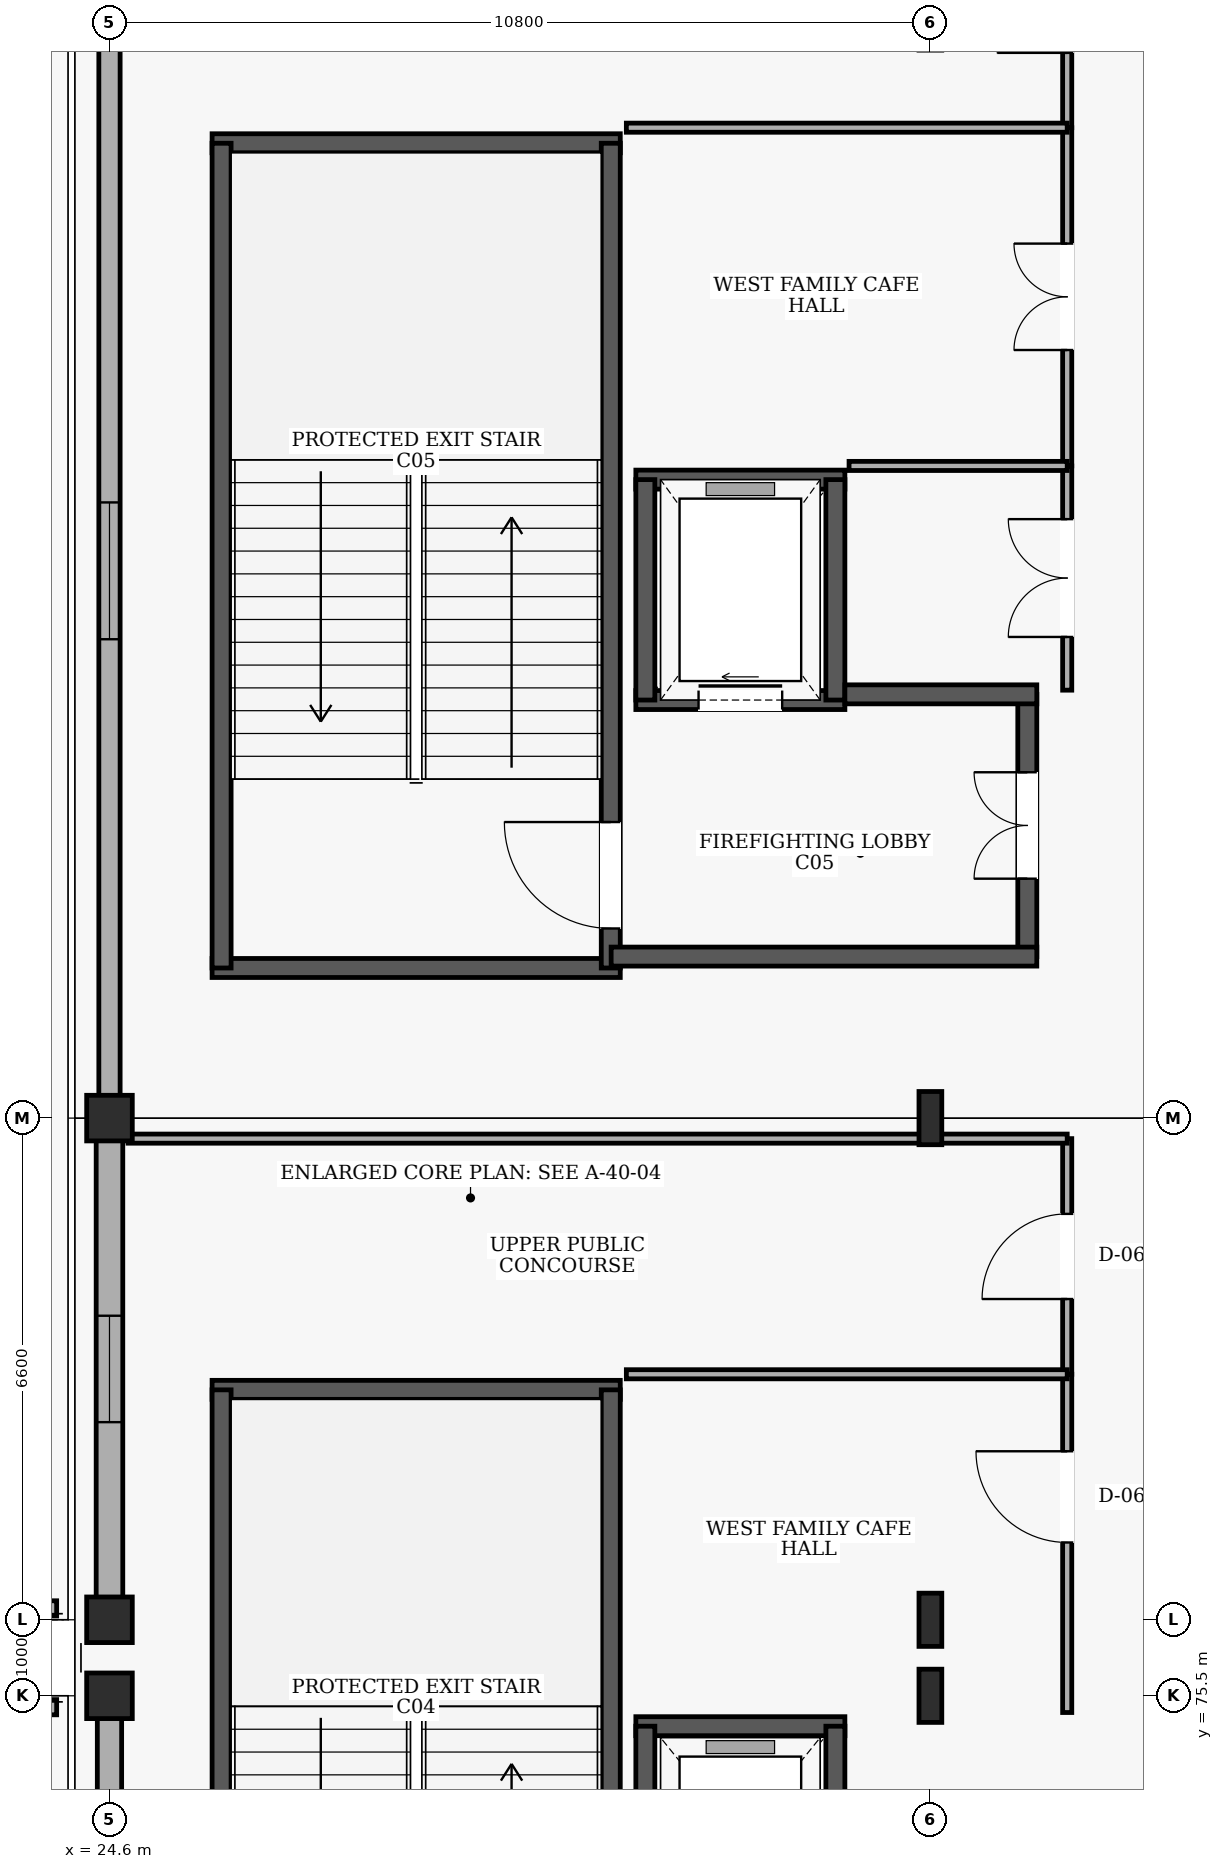
"""IFC4 building model, lengths in metres.
Left out: names, types, materials, properties, quantities, classifications, styles, units other than length and angle.
Written with IfcOpenShell. Run it as: python <this file> out.ifc"""

import sys

from ifc_helpers import new_model, si_unit, direction, frame, frame_2d, origin, origin_2d, place, context, subcontext, project, spatial, rectangle, i_section, extrude, element, fill, save


model = new_model("IFC4")
c1 = context("Model", 3, precision=1e-05, world=origin(), true_north=direction((0.0, 1.0)))
c2 = subcontext(c1, "Body", "Model", "MODEL_VIEW")
j1 = project(units=[si_unit("LENGTHUNIT", "METRE"), si_unit("PLANEANGLEUNIT", "RADIAN")], contexts=[c1])
p1 = place(None, origin())
s1 = spatial("IfcSite", under=j1, at=p1, CompositionType="ELEMENT")
p2 = place(p1, origin())
s2 = spatial("IfcBuilding", under=s1, at=p2, CompositionType="ELEMENT")
p3 = place(p2, frame((0.0, 0.0, 15.0)))
s3 = spatial("IfcBuildingStorey", under=s2, at=p3, CompositionType="ELEMENT", Elevation=15.0)
for number, where, z_axis, x_axis in (
    (1, (24.6, 75.5, 0.0), (0.0, 0.0, 1.0), (1.0, 0.0, 0.0)),
    (2, (24.6, 76.5, 0.0), (0.0, 0.0, 1.0), (1.0, 0.0, 0.0)),
    (3, (24.6, 83.1, 0.0), (0.0, 0.0, 1.0), (1.0, 0.0, 0.0)),
):
    element("IfcColumn", number, at=place(p3, frame(where, z_axis=z_axis, x_axis=x_axis)), inside=s3, PredefinedType="COLUMN", context=c2, shape_type="SweptSolid", body=[
        extrude(rectangle(XDim=0.6, YDim=0.6, at=origin_2d()), origin(), (0.0, 0.0, 1.0), 4.8),
    ])
for number, where, z_axis, x_axis in (
    (4, (35.4, 75.5, 0.0), (0.0, 0.0, 1.0), (1.0, 0.0, 0.0)),
    (5, (35.4, 76.5, 0.0), (0.0, 0.0, 1.0), (1.0, 0.0, 0.0)),
    (6, (35.4, 83.1, 0.0), (0.0, 0.0, 1.0), (1.0, 0.0, 0.0)),
):
    element("IfcColumn", number, at=place(p3, frame(where, z_axis=z_axis, x_axis=x_axis)), inside=s3, PredefinedType="COLUMN", context=c2, shape_type="SweptSolid", body=[
        extrude(i_section(OverallWidth=0.3, OverallDepth=0.7, WebThickness=0.017, FlangeThickness=0.032, at=origin_2d()), origin(), (0.0, 0.0, 1.0), 4.8),
    ])
p4 = place(p3, frame((24.6, 68.995, 0.0), z_axis=(0.0, 0.0, 1.0), x_axis=(0.0, 1.0, 0.0)))
e7 = element("IfcWall", 7, at=p4, inside=s3, PredefinedType="SOLIDWALL", context=c2, shape_type="SweptSolid", body=[
    extrude(rectangle(XDim=6.21, YDim=0.32, at=frame_2d((3.105, 0.0))), origin(), (0.0, 0.0, 1.0), 3.88),
])
p5 = place(p4, frame((1.755, 0.0, 0.9)))
e8 = element("IfcOpeningElement", 8, at=p5, cuts=e7, PredefinedType="OPENING", context=c2, shape_type="SweptSolid", body=[
    extrude(rectangle(XDim=2.7, YDim=1.8, at=frame_2d((1.35, 0.9))), frame((0.0, 0.17, 0.0), z_axis=(0.0, -1.0, 0.0), x_axis=(1.0, 0.0, 0.0)), (0.0, 0.0, 1.0), 0.34),
])
p6 = place(p3, frame((24.6, 76.795, 0.0), z_axis=(0.0, 0.0, 1.0), x_axis=(0.0, 1.0, 0.0)))
e9 = element("IfcWall", 9, at=p6, inside=s3, PredefinedType="SOLIDWALL", context=c2, shape_type="SweptSolid", body=[
    extrude(rectangle(XDim=6.01, YDim=0.35, at=frame_2d((3.005, 0.0))), origin(), (0.0, 0.0, 1.0), 3.98),
])
p7 = place(p6, frame((2.305, 0.0, 0.9)))
e10 = element("IfcOpeningElement", 10, at=p7, cuts=e9, PredefinedType="OPENING", context=c2, shape_type="SweptSolid", body=[
    extrude(rectangle(XDim=1.4, YDim=2.1, at=frame_2d((0.7, 1.05))), frame((0.0, 0.185, 0.0), z_axis=(0.0, -1.0, 0.0), x_axis=(1.0, 0.0, 0.0)), (0.0, 0.0, 1.0), 0.37),
])
p8 = place(p3, frame((24.6, 83.395, 0.0), z_axis=(0.0, 0.0, 1.0), x_axis=(0.0, 1.0, 0.0)))
e11 = element("IfcWall", 11, at=p8, inside=s3, PredefinedType="SOLIDWALL", context=c2, shape_type="SweptSolid", body=[
    extrude(rectangle(XDim=13.81, YDim=0.28, at=frame_2d((6.905, 0.0))), origin(), (0.0, 0.0, 1.0), 3.58),
])
p9 = place(p8, frame((6.005, 0.0, 0.9)))
e12 = element("IfcOpeningElement", 12, at=p9, cuts=e11, PredefinedType="OPENING", context=c2, shape_type="SweptSolid", body=[
    extrude(rectangle(XDim=1.8, YDim=2.1, at=frame_2d((0.9, 1.05))), frame((0.0, 0.15, 0.0), z_axis=(0.0, -1.0, 0.0), x_axis=(1.0, 0.0, 0.0)), (0.0, 0.0, 1.0), 0.3),
])
for number, where, z_axis, x_axis in (
    (13, (14.028, 76.65, 0.0), (0.0, 0.0, 1.0), (1.0, 0.0, 0.0)),
    (14, (23.905, 75.35, 0.0), (0.0, 0.0, 1.0), (-1.0, 0.0, 0.0)),
):
    element("IfcWall", number, at=place(p3, frame(where, z_axis=z_axis, x_axis=x_axis)), inside=s3, PredefinedType="PARAPET", context=c2, shape_type="SweptSolid", body=[
        extrude(rectangle(XDim=9.877, YDim=0.2, at=frame_2d((4.939, 0.0))), origin(), (0.0, 0.0, 1.0), 1.15),
    ])
p10 = place(p3, frame((31.32, 79.525, 0.0), z_axis=(0.0, 0.0, 1.0), x_axis=(-1.0, 0.0, 0.0)))
e15 = element("IfcWall", 15, at=p10, inside=s3, PredefinedType="SHEAR", context=c2, shape_type="SweptSolid", body=[
    extrude(rectangle(XDim=5.37, YDim=0.25, at=frame_2d((2.685, 0.0))), origin(), (0.0, 0.0, 1.0), 4.5),
])
p11 = place(p3, frame((26.075, 68.675, 0.0), z_axis=(0.0, 0.0, 1.0), x_axis=(0.0, 1.0, 0.0)))
e16 = element("IfcWall", 16, at=p11, inside=s3, PredefinedType="SHEAR", context=c2, shape_type="SweptSolid", body=[
    extrude(rectangle(XDim=10.85, YDim=0.25, at=frame_2d((5.425, 0.0))), origin(), (0.0, 0.0, 1.0), 4.5),
])
p12 = place(p3, frame((31.195, 68.675, 0.0), z_axis=(0.0, 0.0, 1.0), x_axis=(0.0, 1.0, 0.0)))
e17 = element("IfcWall", 17, at=p12, inside=s3, PredefinedType="SHEAR", context=c2, shape_type="SweptSolid", body=[
    extrude(rectangle(XDim=10.85, YDim=0.25, at=frame_2d((5.425, 0.0))), origin(), (0.0, 0.0, 1.0), 4.5),
])
p13 = place(p12, frame((0.52, 0.0, 0.0)))
e18 = element("IfcOpeningElement", 18, at=p13, cuts=e17, PredefinedType="OPENING", context=c2, shape_type="SweptSolid", body=[
    extrude(rectangle(XDim=1.4, YDim=2.15, at=frame_2d((0.7, 1.075))), frame((0.0, 0.135, 0.0), z_axis=(0.0, -1.0, 0.0), x_axis=(1.0, 0.0, 0.0)), (0.0, 0.0, 1.0), 0.27),
])
for number, where, z_axis, x_axis in (
    (19, (25.95, 85.075, 0.0), (0.0, 0.0, 1.0), (1.0, 0.0, 0.0)),
    (20, (31.32, 95.925, 0.0), (0.0, 0.0, 1.0), (-1.0, 0.0, 0.0)),
):
    element("IfcWall", number, at=place(p3, frame(where, z_axis=z_axis, x_axis=x_axis)), inside=s3, PredefinedType="SHEAR", context=c2, shape_type="SweptSolid", body=[
        extrude(rectangle(XDim=5.37, YDim=0.25, at=frame_2d((2.685, 0.0))), origin(), (0.0, 0.0, 1.0), 4.5),
    ])
p14 = place(p3, frame((26.075, 85.075, 0.0), z_axis=(0.0, 0.0, 1.0), x_axis=(0.0, 1.0, 0.0)))
e21 = element("IfcWall", 21, at=p14, inside=s3, PredefinedType="SHEAR", context=c2, shape_type="SweptSolid", body=[
    extrude(rectangle(XDim=10.85, YDim=0.25, at=frame_2d((5.425, 0.0))), origin(), (0.0, 0.0, 1.0), 4.5),
])
p15 = place(p3, frame((31.195, 85.075, 0.0), z_axis=(0.0, 0.0, 1.0), x_axis=(0.0, 1.0, 0.0)))
e22 = element("IfcWall", 22, at=p15, inside=s3, PredefinedType="SHEAR", context=c2, shape_type="SweptSolid", body=[
    extrude(rectangle(XDim=10.85, YDim=0.25, at=frame_2d((5.425, 0.0))), origin(), (0.0, 0.0, 1.0), 4.5),
])
p16 = place(p15, frame((0.52, 0.0, 0.0)))
e23 = element("IfcOpeningElement", 23, at=p16, cuts=e22, PredefinedType="OPENING", context=c2, shape_type="SweptSolid", body=[
    extrude(rectangle(XDim=1.4, YDim=2.15, at=frame_2d((0.7, 1.075))), frame((0.0, 0.135, 0.0), z_axis=(0.0, -1.0, 0.0), x_axis=(1.0, 0.0, 0.0)), (0.0, 0.0, 1.0), 0.27),
])
p17 = place(p3, frame((34.275, 75.1, 0.0), z_axis=(0.0, 0.0, 1.0), x_axis=(-1.0, 0.0, 0.0)))
e24 = element("IfcWall", 24, at=p17, inside=s3, PredefinedType="SHEAR", context=c2, shape_type="SweptSolid", body=[
    extrude(rectangle(XDim=2.75, YDim=0.25, at=frame_2d((1.375, 0.0))), origin(), (0.0, 0.0, 1.0), 4.5),
])
for number, where, z_axis, x_axis in (
    (25, (31.65, 75.1, 0.0), (0.0, 0.0, 1.0), (0.0, -1.0, 0.0)),
    (26, (34.15, 72.2, 0.0), (0.0, 0.0, 1.0), (0.0, 1.0, 0.0)),
):
    element("IfcWall", number, at=place(p3, frame(where, z_axis=z_axis, x_axis=x_axis)), inside=s3, PredefinedType="SHEAR", context=c2, shape_type="SweptSolid", body=[
        extrude(rectangle(XDim=2.9, YDim=0.25, at=frame_2d((1.45, 0.0))), origin(), (0.0, 0.0, 1.0), 4.5),
    ])
p18 = place(p3, frame((31.525, 88.6, 0.0), z_axis=(0.0, 0.0, 1.0), x_axis=(1.0, 0.0, 0.0)))
e27 = element("IfcWall", 27, at=p18, inside=s3, PredefinedType="SHEAR", context=c2, shape_type="SweptSolid", body=[
    extrude(rectangle(XDim=2.75, YDim=0.25, at=frame_2d((1.375, 0.0))), origin(), (0.0, 0.0, 1.0), 4.5),
])
p19 = place(p18, frame((0.825, 0.0, 0.0)))
e28 = element("IfcOpeningElement", 28, at=p19, cuts=e27, PredefinedType="OPENING", context=c2, shape_type="SweptSolid", body=[
    extrude(rectangle(XDim=1.1, YDim=2.15, at=frame_2d((0.55, 1.075))), frame((0.0, 0.135, 0.0), z_axis=(0.0, -1.0, 0.0), x_axis=(1.0, 0.0, 0.0)), (0.0, 0.0, 1.0), 0.27),
])
p20 = place(p3, frame((34.275, 91.5, 0.0), z_axis=(0.0, 0.0, 1.0), x_axis=(-1.0, 0.0, 0.0)))
e29 = element("IfcWall", 29, at=p20, inside=s3, PredefinedType="SHEAR", context=c2, shape_type="SweptSolid", body=[
    extrude(rectangle(XDim=2.75, YDim=0.25, at=frame_2d((1.375, 0.0))), origin(), (0.0, 0.0, 1.0), 4.5),
])
for number, where, z_axis, x_axis in (
    (30, (31.65, 91.5, 0.0), (0.0, 0.0, 1.0), (0.0, -1.0, 0.0)),
    (31, (34.15, 88.6, 0.0), (0.0, 0.0, 1.0), (0.0, 1.0, 0.0)),
):
    element("IfcWall", number, at=place(p3, frame(where, z_axis=z_axis, x_axis=x_axis)), inside=s3, PredefinedType="SHEAR", context=c2, shape_type="SweptSolid", body=[
        extrude(rectangle(XDim=2.9, YDim=0.25, at=frame_2d((1.45, 0.0))), origin(), (0.0, 0.0, 1.0), 4.5),
    ])
p21 = place(p3, frame((36.675, 85.225, 0.0), z_axis=(0.0, 0.0, 1.0), x_axis=(0.0, 1.0, 0.0)))
e32 = element("IfcWall", 32, at=p21, inside=s3, PredefinedType="SHEAR", context=c2, shape_type="SweptSolid", body=[
    extrude(rectangle(XDim=3.45, YDim=0.25, at=frame_2d((1.725, 0.0))), origin(), (0.0, 0.0, 1.0), 4.5),
])
p22 = place(p21, frame((1.025, 0.0, 0.0)))
e33 = element("IfcOpeningElement", 33, at=p22, cuts=e32, PredefinedType="OPENING", context=c2, shape_type="SweptSolid", body=[
    extrude(rectangle(XDim=1.4, YDim=2.15, at=frame_2d((0.7, 1.075))), frame((0.0, 0.135, 0.0), z_axis=(0.0, -1.0, 0.0), x_axis=(1.0, 0.0, 0.0)), (0.0, 0.0, 1.0), 0.27),
])
p23 = place(p3, frame((34.275, 88.675, 0.0), z_axis=(0.0, 0.0, 1.0), x_axis=(1.0, 0.0, 0.0)))
e34 = element("IfcWall", 34, at=p23, inside=s3, PredefinedType="SHEAR", context=c2, shape_type="SweptSolid", body=[
    extrude(rectangle(XDim=2.525, YDim=0.25, at=frame_2d((1.263, 0.0))), origin(), (0.0, 0.0, 1.0), 4.5),
])
p24 = place(p3, frame((31.2, 85.225, 0.0), z_axis=(0.0, 0.0, 1.0), x_axis=(1.0, 0.0, 0.0)))
e35 = element("IfcWall", 35, at=p24, inside=s3, PredefinedType="SHEAR", context=c2, shape_type="SweptSolid", body=[
    extrude(rectangle(XDim=5.6, YDim=0.25, at=frame_2d((2.8, 0.0))), origin(), (0.0, 0.0, 1.0), 4.5),
])
p25 = place(p3, frame((37.2, 79.73, 0.0), z_axis=(0.0, 0.0, 1.0), x_axis=(0.0, 1.0, 0.0)))
e36 = element("IfcWall", 36, at=p25, inside=s3, PredefinedType="PARTITIONING", context=c2, shape_type="SweptSolid", body=[
    extrude(rectangle(XDim=3.1, YDim=0.12, at=frame_2d((1.55, 0.0))), origin(), (0.0, 0.0, 1.0), 4.5),
])
p26 = place(p25, frame((0.99, 0.0, 0.0)))
e37 = element("IfcOpeningElement", 37, at=p26, cuts=e36, PredefinedType="OPENING", context=c2, shape_type="SweptSolid", body=[
    extrude(rectangle(XDim=1.12, YDim=2.15, at=frame_2d((0.56, 1.075))), frame((0.0, 0.07, 0.0), z_axis=(0.0, -1.0, 0.0), x_axis=(1.0, 0.0, 0.0)), (0.0, 0.0, 1.0), 0.14),
])
p27 = place(p3, frame((37.2, 82.83, 0.0), z_axis=(0.0, 0.0, 1.0), x_axis=(-1.0, 0.0, 0.0)))
e38 = element("IfcWall", 38, at=p27, inside=s3, PredefinedType="PARTITIONING", context=c2, shape_type="SweptSolid", body=[
    extrude(rectangle(XDim=12.355, YDim=0.12, at=frame_2d((6.177, 0.0))), origin(), (0.0, 0.0, 1.0), 3.68),
])
p28 = place(p3, frame((37.2, 75.28, 0.0), z_axis=(0.0, 0.0, 1.0), x_axis=(0.0, 1.0, 0.0)))
e39 = element("IfcWall", 39, at=p28, inside=s3, PredefinedType="PARTITIONING", context=c2, shape_type="SweptSolid", body=[
    extrude(rectangle(XDim=4.45, YDim=0.12, at=frame_2d((2.225, 0.0))), origin(), (0.0, 0.0, 1.0), 4.5),
])
p29 = place(p28, frame((2.237, 0.0, 0.0)))
e40 = element("IfcOpeningElement", 40, at=p29, cuts=e39, PredefinedType="OPENING", context=c2, shape_type="SweptSolid", body=[
    extrude(rectangle(XDim=1.2, YDim=2.15, at=frame_2d((0.6, 1.075))), frame((0.0, 0.07, 0.0), z_axis=(0.0, -1.0, 0.0), x_axis=(1.0, 0.0, 0.0)), (0.0, 0.0, 1.0), 0.14),
])
p30 = place(p3, frame((37.2, 79.73, 0.0), z_axis=(0.0, 0.0, 1.0), x_axis=(-1.0, 0.0, 0.0)))
e41 = element("IfcWall", 41, at=p30, inside=s3, PredefinedType="PARTITIONING", context=c2, shape_type="SweptSolid", body=[
    extrude(rectangle(XDim=5.8, YDim=0.12, at=frame_2d((2.9, 0.0))), origin(), (0.0, 0.0, 1.0), 4.5),
])
p31 = place(p3, frame((37.2, 96.13, 0.0), z_axis=(0.0, 0.0, 1.0), x_axis=(0.0, 1.0, 0.0)))
e42 = element("IfcWall", 42, at=p31, inside=s3, PredefinedType="PARTITIONING", context=c2, shape_type="SweptSolid", body=[
    extrude(rectangle(XDim=2.889, YDim=0.12, at=frame_2d((1.444, 0.0))), origin(), (0.0, 0.0, 1.0), 4.5),
])
p32 = place(p31, frame((0.984, 0.0, 0.0)))
e43 = element("IfcOpeningElement", 43, at=p32, cuts=e42, PredefinedType="OPENING", context=c2, shape_type="SweptSolid", body=[
    extrude(rectangle(XDim=0.92, YDim=2.1, at=frame_2d((0.46, 1.05))), frame((0.0, 0.07, 0.0), z_axis=(0.0, -1.0, 0.0), x_axis=(1.0, 0.0, 0.0)), (0.0, 0.0, 1.0), 0.14),
])
p33 = place(p3, frame((37.2, 91.68, 0.0), z_axis=(0.0, 0.0, 1.0), x_axis=(0.0, 1.0, 0.0)))
e44 = element("IfcWall", 44, at=p33, inside=s3, PredefinedType="PARTITIONING", context=c2, shape_type="SweptSolid", body=[
    extrude(rectangle(XDim=4.45, YDim=0.12, at=frame_2d((2.225, 0.0))), origin(), (0.0, 0.0, 1.0), 4.5),
])
p34 = place(p33, frame((1.525, 0.0, 0.0)))
e45 = element("IfcOpeningElement", 45, at=p34, cuts=e44, PredefinedType="OPENING", context=c2, shape_type="SweptSolid", body=[
    extrude(rectangle(XDim=1.4, YDim=2.2, at=frame_2d((0.7, 1.1))), frame((0.0, 0.07, 0.0), z_axis=(0.0, -1.0, 0.0), x_axis=(1.0, 0.0, 0.0)), (0.0, 0.0, 1.0), 0.14),
])
p35 = place(p3, frame((37.2, 96.13, 0.0), z_axis=(0.0, 0.0, 1.0), x_axis=(-1.0, 0.0, 0.0)))
e46 = element("IfcWall", 46, at=p35, inside=s3, PredefinedType="PARTITIONING", context=c2, shape_type="SweptSolid", body=[
    extrude(rectangle(XDim=5.8, YDim=0.12, at=frame_2d((2.9, 0.0))), origin(), (0.0, 0.0, 1.0), 4.5),
])
p36 = place(p3, frame((37.2, 88.73, 0.0), z_axis=(0.0, 0.0, 1.0), x_axis=(0.0, 1.0, 0.0)))
e47 = element("IfcWall", 47, at=p36, inside=s3, PredefinedType="PARTITIONING", context=c2, shape_type="SweptSolid", body=[
    extrude(rectangle(XDim=2.95, YDim=0.12, at=frame_2d((1.475, 0.0))), origin(), (0.0, 0.0, 1.0), 4.5),
])
p37 = place(p36, frame((0.7, 0.0, 0.0)))
e48 = element("IfcOpeningElement", 48, at=p37, cuts=e47, PredefinedType="OPENING", context=c2, shape_type="SweptSolid", body=[
    extrude(rectangle(XDim=1.55, YDim=2.2, at=frame_2d((0.775, 1.1))), frame((0.0, 0.07, 0.0), z_axis=(0.0, -1.0, 0.0), x_axis=(1.0, 0.0, 0.0)), (0.0, 0.0, 1.0), 0.14),
])
p38 = place(p3, frame((37.2, 91.68, 0.0), z_axis=(0.0, 0.0, 1.0), x_axis=(-1.0, 0.0, 0.0)))
e49 = element("IfcWall", 49, at=p38, inside=s3, PredefinedType="PARTITIONING", context=c2, shape_type="SweptSolid", body=[
    extrude(rectangle(XDim=2.87, YDim=0.12, at=frame_2d((1.435, 0.0))), origin(), (0.0, 0.0, 1.0), 4.5),
])
p39 = place(p7, origin())
e50 = element("IfcWindow", 50, at=p39, inside=s3, PartitioningType="SINGLE_PANEL", PredefinedType="WINDOW", context=c2, shape_type="SweptSolid", body=[
    extrude(rectangle(XDim=1.4, YDim=2.1, at=frame_2d((0.7, 1.05))), frame((0.0, 0.03, 0.0), z_axis=(0.0, -1.0, 0.0), x_axis=(1.0, 0.0, 0.0)), (0.0, 0.0, 1.0), 0.06),
])
fill(e10, e50)
p40 = place(p9, origin())
e51 = element("IfcWindow", 51, at=p40, inside=s3, PartitioningType="SINGLE_PANEL", PredefinedType="WINDOW", context=c2, shape_type="SweptSolid", body=[
    extrude(rectangle(XDim=1.8, YDim=2.1, at=frame_2d((0.9, 1.05))), frame((0.0, 0.03, 0.0), z_axis=(0.0, -1.0, 0.0), x_axis=(1.0, 0.0, 0.0)), (0.0, 0.0, 1.0), 0.06),
])
fill(e12, e51)
p41 = place(p16, origin())
e52 = element("IfcDoor", 52, at=p41, inside=s3, OperationType="SINGLE_SWING_RIGHT", PredefinedType="DOOR", context=c2, shape_type="SweptSolid", body=[
    extrude(rectangle(XDim=1.4, YDim=2.15, at=frame_2d((0.7, 1.075))), frame((0.0, 0.025, 0.0), z_axis=(0.0, -1.0, 0.0), x_axis=(1.0, 0.0, 0.0)), (0.0, 0.0, 1.0), 0.05),
])
fill(e23, e52)
p42 = place(p19, origin())
e53 = element("IfcDoor", 53, at=p42, inside=s3, OperationType="SLIDING_TO_RIGHT", PredefinedType="DOOR", context=c2, shape_type="SweptSolid", body=[
    extrude(rectangle(XDim=1.1, YDim=2.15, at=frame_2d((0.55, 1.075))), frame((0.0, 0.025, 0.0), z_axis=(0.0, -1.0, 0.0), x_axis=(1.0, 0.0, 0.0)), (0.0, 0.0, 1.0), 0.05),
])
fill(e28, e53)
p43 = place(p22, origin())
e54 = element("IfcDoor", 54, at=p43, inside=s3, OperationType="DOUBLE_DOOR_SINGLE_SWING", PredefinedType="DOOR", context=c2, shape_type="SweptSolid", body=[
    extrude(rectangle(XDim=1.4, YDim=2.15, at=frame_2d((0.7, 1.075))), frame((0.0, 0.025, 0.0), z_axis=(0.0, -1.0, 0.0), x_axis=(1.0, 0.0, 0.0)), (0.0, 0.0, 1.0), 0.05),
])
fill(e33, e54)
p44 = place(p26, origin())
e55 = element("IfcDoor", 55, at=p44, inside=s3, OperationType="SINGLE_SWING_LEFT", PredefinedType="DOOR", context=c2, shape_type="SweptSolid", body=[
    extrude(rectangle(XDim=1.12, YDim=2.15, at=frame_2d((0.56, 1.075))), frame((0.0, 0.025, 0.0), z_axis=(0.0, -1.0, 0.0), x_axis=(1.0, 0.0, 0.0)), (0.0, 0.0, 1.0), 0.05),
])
fill(e37, e55)
p45 = place(p29, origin())
e56 = element("IfcDoor", 56, at=p45, inside=s3, OperationType="SINGLE_SWING_RIGHT", PredefinedType="DOOR", context=c2, shape_type="SweptSolid", body=[
    extrude(rectangle(XDim=1.2, YDim=2.15, at=frame_2d((0.6, 1.075))), frame((0.0, 0.025, 0.0), z_axis=(0.0, -1.0, 0.0), x_axis=(1.0, 0.0, 0.0)), (0.0, 0.0, 1.0), 0.05),
])
fill(e40, e56)
p46 = place(p32, origin())
e57 = element("IfcDoor", 57, at=p46, inside=s3, OperationType="SINGLE_SWING_LEFT", PredefinedType="DOOR", context=c2, shape_type="SweptSolid", body=[
    extrude(rectangle(XDim=0.92, YDim=2.1, at=frame_2d((0.46, 1.05))), frame((0.0, 0.025, 0.0), z_axis=(0.0, -1.0, 0.0), x_axis=(1.0, 0.0, 0.0)), (0.0, 0.0, 1.0), 0.05),
])
fill(e43, e57)
p47 = place(p34, origin())
e58 = element("IfcDoor", 58, at=p47, inside=s3, OperationType="DOUBLE_DOOR_SINGLE_SWING", PredefinedType="DOOR", context=c2, shape_type="SweptSolid", body=[
    extrude(rectangle(XDim=1.4, YDim=2.2, at=frame_2d((0.7, 1.1))), frame((0.0, 0.025, 0.0), z_axis=(0.0, -1.0, 0.0), x_axis=(1.0, 0.0, 0.0)), (0.0, 0.0, 1.0), 0.05),
])
fill(e45, e58)
p48 = place(p37, origin())
e59 = element("IfcDoor", 59, at=p48, inside=s3, OperationType="DOUBLE_DOOR_SINGLE_SWING", PredefinedType="DOOR", context=c2, shape_type="SweptSolid", body=[
    extrude(rectangle(XDim=1.55, YDim=2.2, at=frame_2d((0.775, 1.1))), frame((0.0, 0.025, 0.0), z_axis=(0.0, -1.0, 0.0), x_axis=(1.0, 0.0, 0.0)), (0.0, 0.0, 1.0), 0.05),
])
fill(e48, e59)
save(model, sys.argv[1])
